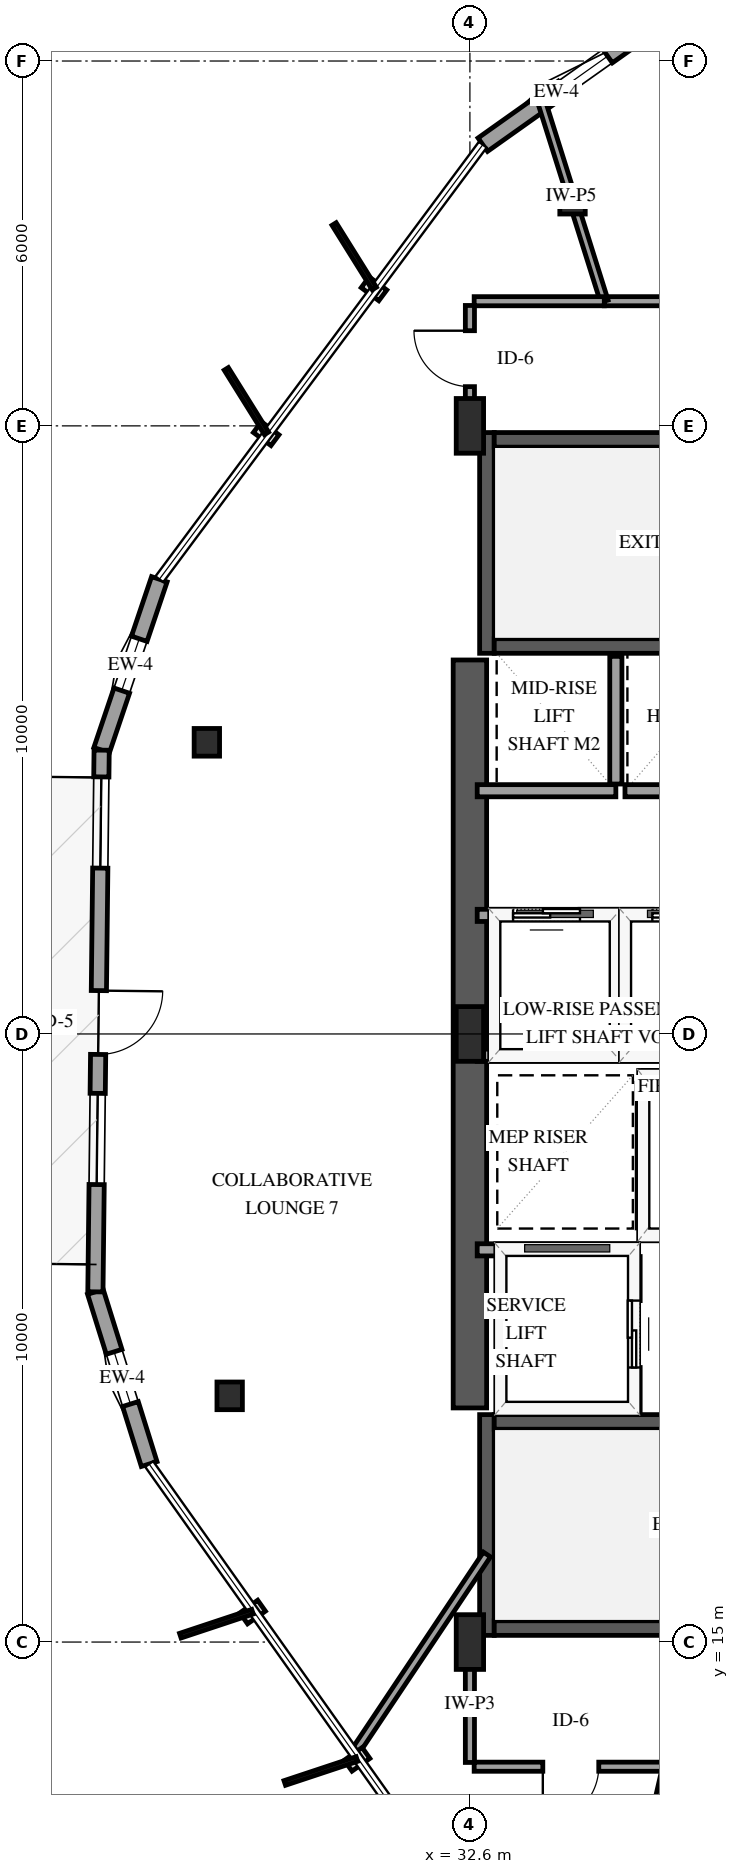
"""IFC4 building model, lengths in metres.
Left out: names, types, materials, properties, quantities, classifications, styles, units other than length and angle.
Written with IfcOpenShell. Run it as: python <this file> out.ifc"""

import sys

from ifc_helpers import new_model, si_unit, direction, frame, frame_2d, origin, origin_2d, place, context, subcontext, project, spatial, rectangle, i_section, extrude, element, fill, save


model = new_model("IFC4")
c1 = context("Model", 3, precision=1e-05, world=origin(), true_north=direction((0.0, 1.0)))
c2 = subcontext(c1, "Body", "Model", "MODEL_VIEW")
j1 = project(units=[si_unit("LENGTHUNIT", "METRE"), si_unit("PLANEANGLEUNIT", "RADIAN")], contexts=[c1])
p1 = place(None, origin())
s1 = spatial("IfcSite", under=j1, at=p1, CompositionType="ELEMENT")
p2 = place(p1, origin())
s2 = spatial("IfcBuilding", under=s1, at=p2, CompositionType="ELEMENT")
p3 = place(p2, frame((0.0, 0.0, 95.2)))
s3 = spatial("IfcBuildingStorey", under=s2, at=p3, CompositionType="ELEMENT", Elevation=95.2)
p4 = place(p3, frame((32.88, 15.11, 0.0), z_axis=(0.0, 0.0, 1.0), x_axis=(0.0, 1.0, 0.0)))
e1 = element("IfcWall", 1, at=p4, inside=s3, PredefinedType="SHEAR", context=c2, shape_type="SweptSolid", body=[
    extrude(rectangle(XDim=3.63, YDim=0.24, at=frame_2d((1.815, 0.0))), origin(), (0.0, 0.0, 1.0), 3.9),
])
for number, where, z_axis, x_axis in (
    (2, (33.0, 15.23, 0.0), (0.0, 0.0, 1.0), (1.0, 0.0, 0.0)),
    (3, (33.0, 18.62, 0.0), (0.0, 0.0, 1.0), (1.0, 0.0, 0.0)),
):
    element("IfcWall", number, at=place(p3, frame(where, z_axis=z_axis, x_axis=x_axis)), inside=s3, PredefinedType="SHEAR", context=c2, shape_type="SweptSolid", body=[
        extrude(rectangle(XDim=8.0, YDim=0.24, at=frame_2d((4.0, 0.0))), origin(), (0.0, 0.0, 1.0), 3.9),
    ])
p5 = place(p3, frame((32.88, 31.26, 0.0), z_axis=(0.0, 0.0, 1.0), x_axis=(0.0, 1.0, 0.0)))
e4 = element("IfcWall", 4, at=p5, inside=s3, PredefinedType="SHEAR", context=c2, shape_type="SweptSolid", body=[
    extrude(rectangle(XDim=3.63, YDim=0.24, at=frame_2d((1.815, 0.0))), origin(), (0.0, 0.0, 1.0), 3.9),
])
for number, where, z_axis, x_axis in (
    (5, (33.0, 31.38, 0.0), (0.0, 0.0, 1.0), (1.0, 0.0, 0.0)),
    (6, (33.0, 34.77, 0.0), (0.0, 0.0, 1.0), (1.0, 0.0, 0.0)),
):
    element("IfcWall", number, at=place(p3, frame(where, z_axis=z_axis, x_axis=x_axis)), inside=s3, PredefinedType="SHEAR", context=c2, shape_type="SweptSolid", body=[
        extrude(rectangle(XDim=8.0, YDim=0.24, at=frame_2d((4.0, 0.0))), origin(), (0.0, 0.0, 1.0), 3.9),
    ])
p6 = place(p3, frame((32.6, 18.85, 0.0), z_axis=(0.0, 0.0, 1.0), x_axis=(0.0, 1.0, 0.0)))
e7 = element("IfcWall", 7, at=p6, inside=s3, PredefinedType="SHEAR", context=c2, shape_type="SweptSolid", body=[
    extrude(rectangle(XDim=12.3, YDim=0.55, at=frame_2d((6.15, 0.0))), origin(), (0.0, 0.0, 1.0), 3.9),
])
for number, where, z_axis, x_axis in (
    (8, (32.6, 15.0, 0.0), (0.0, 0.0, 1.0), (1.0, 0.0, 0.0)),
    (9, (32.6, 25.0, 0.0), (0.0, 0.0, 1.0), (1.0, 0.0, 0.0)),
    (10, (32.6, 35.0, 0.0), (0.0, 0.0, 1.0), (1.0, 0.0, 0.0)),
):
    element("IfcColumn", number, at=place(p3, frame(where, z_axis=z_axis, x_axis=x_axis)), inside=s3, PredefinedType="PILASTER", context=c2, shape_type="SweptSolid", body=[
        extrude(rectangle(XDim=0.45, YDim=0.9, at=origin_2d()), origin(), (0.0, 0.0, 1.0), 3.9),
    ])
for number, where, z_axis, x_axis in (
    (11, (34.288, 38.711, 0.0), (0.0, 0.0, 1.0), (1.0, 0.0, 0.0)),
    (12, (28.274, 29.796, 0.0), (0.0, 0.0, 1.0), (1.0, 0.0, 0.0)),
    (13, (28.649, 19.049, 0.0), (0.0, 0.0, 1.0), (1.0, 0.0, 0.0)),
):
    element("IfcColumn", number, at=place(p3, frame(where, z_axis=z_axis, x_axis=x_axis)), inside=s3, PredefinedType="COLUMN", context=c2, shape_type="SweptSolid", body=[
        extrude(i_section(OverallWidth=0.418, OverallDepth=0.455, WebThickness=0.042, FlangeThickness=0.068, FilletRadius=0.038, at=origin_2d()), origin(), (0.0, 0.0, 1.0), 3.9),
    ])
p7 = place(p3, frame((35.232, 41.34, 0.0), z_axis=(0.0, 0.0, 1.0), x_axis=(-0.815686288548, -0.57849449321, 0.0)))
e14 = element("IfcWall", 14, at=p7, inside=s3, PredefinedType="SOLIDWALL", context=c2, shape_type="SweptSolid", body=[
    extrude(rectangle(XDim=2.967, YDim=0.27, at=frame_2d((1.483, 0.0))), origin(), (0.0, 0.0, 1.0), 2.979),
])
p8 = place(p7, frame((0.45, 0.0, 0.75)))
e15 = element("IfcOpeningElement", 15, at=p8, cuts=e14, PredefinedType="OPENING", context=c2, shape_type="SweptSolid", body=[
    extrude(rectangle(XDim=0.9, YDim=1.5, at=frame_2d((0.45, 0.75))), frame((0.0, 0.145, 0.0), z_axis=(0.0, -1.0, 0.0), x_axis=(1.0, 0.0, 0.0)), (0.0, 0.0, 1.0), 0.29),
])
p9 = place(p3, frame((27.493, 32.478, 0.0), z_axis=(0.0, 0.0, 1.0), x_axis=(-0.319978121569, -0.94742493197, 0.0)))
e16 = element("IfcWall", 16, at=p9, inside=s3, PredefinedType="SOLIDWALL", context=c2, shape_type="SweptSolid", body=[
    extrude(rectangle(XDim=2.967, YDim=0.27, at=frame_2d((1.483, 0.0))), origin(), (0.0, 0.0, 1.0), 2.979),
])
p10 = place(p9, frame((1.033, 0.0, 0.75)))
e17 = element("IfcOpeningElement", 17, at=p10, cuts=e16, PredefinedType="OPENING", context=c2, shape_type="SweptSolid", body=[
    extrude(rectangle(XDim=0.9, YDim=1.5, at=frame_2d((0.45, 0.75))), frame((0.0, 0.145, 0.0), z_axis=(0.0, -1.0, 0.0), x_axis=(1.0, 0.0, 0.0)), (0.0, 0.0, 1.0), 0.29),
])
p11 = place(p3, frame((26.441, 20.759, 0.0), z_axis=(0.0, 0.0, 1.0), x_axis=(0.297998508568, -0.954566335511, 0.0)))
e18 = element("IfcWall", 18, at=p11, inside=s3, PredefinedType="SOLIDWALL", context=c2, shape_type="SweptSolid", body=[
    extrude(rectangle(XDim=2.967, YDim=0.27, at=frame_2d((1.483, 0.0))), origin(), (0.0, 0.0, 1.0), 2.979),
])
p12 = place(p11, frame((1.033, 0.0, 0.75)))
e19 = element("IfcOpeningElement", 19, at=p12, cuts=e18, PredefinedType="OPENING", context=c2, shape_type="SweptSolid", body=[
    extrude(rectangle(XDim=0.9, YDim=1.5, at=frame_2d((0.45, 0.75))), frame((0.0, 0.145, 0.0), z_axis=(0.0, -1.0, 0.0), x_axis=(1.0, 0.0, 0.0)), (0.0, 0.0, 1.0), 0.29),
])
p13 = place(p3, frame((26.544, 29.667, 0.0), z_axis=(0.0, 0.0, 1.0), x_axis=(-0.011510186569, -0.999933755608, 0.0)))
e20 = element("IfcWall", 20, at=p13, inside=s3, PredefinedType="SOLIDWALL", context=c2, shape_type="SweptSolid", body=[
    extrude(rectangle(XDim=8.908, YDim=0.25, at=frame_2d((4.454, 0.0))), origin(), (0.0, 0.0, 1.0), 2.979),
])
p14 = place(p13, frame((3.954, 0.0, 0.0)))
e21 = element("IfcOpeningElement", 21, at=p14, cuts=e20, PredefinedType="OPENING", context=c2, shape_type="SweptSolid", body=[
    extrude(rectangle(XDim=1.05, YDim=2.15, at=frame_2d((0.525, 1.075))), frame((0.0, 0.135, 0.0), z_axis=(0.0, -1.0, 0.0), x_axis=(1.0, 0.0, 0.0)), (0.0, 0.0, 1.0), 0.27),
])
p15 = place(p13, frame((0.44, 0.0, 0.72)))
e22 = element("IfcOpeningElement", 22, at=p15, cuts=e20, PredefinedType="OPENING", context=c2, shape_type="SweptSolid", body=[
    extrude(rectangle(XDim=1.5, YDim=1.7, at=frame_2d((0.75, 0.85))), frame((0.0, 0.135, 0.0), z_axis=(0.0, -1.0, 0.0), x_axis=(1.0, 0.0, 0.0)), (0.0, 0.0, 1.0), 0.27),
])
p16 = place(p13, frame((5.644, 0.0, 0.72)))
e23 = element("IfcOpeningElement", 23, at=p16, cuts=e20, PredefinedType="OPENING", context=c2, shape_type="SweptSolid", body=[
    extrude(rectangle(XDim=1.5, YDim=1.7, at=frame_2d((0.75, 0.85))), frame((0.0, 0.135, 0.0), z_axis=(0.0, -1.0, 0.0), x_axis=(1.0, 0.0, 0.0)), (0.0, 0.0, 1.0), 0.27),
])
p17 = place(p3, frame((35.45, 21.7, 0.0), z_axis=(0.0, 0.0, 1.0), x_axis=(1.0, 0.0, 0.0)))
e24 = element("IfcWall", 24, at=p17, inside=s3, PredefinedType="SOLIDWALL", context=c2, shape_type="SweptSolid", body=[
    extrude(rectangle(XDim=2.0, YDim=0.2, at=frame_2d((1.0, 0.0))), origin(), (0.0, 0.0, 1.0), 3.6),
])
p18 = place(p17, frame((0.45, 0.0, 0.0)))
e25 = element("IfcOpeningElement", 25, at=p18, cuts=e24, PredefinedType="OPENING", context=c2, shape_type="SweptSolid", body=[
    extrude(rectangle(XDim=1.1, YDim=2.15, at=frame_2d((0.55, 1.075))), frame((0.0, 0.11, 0.0), z_axis=(0.0, -1.0, 0.0), x_axis=(1.0, 0.0, 0.0)), (0.0, 0.0, 1.0), 0.22),
])
p19 = place(p3, frame((35.45, 24.3, 0.0), z_axis=(0.0, 0.0, 1.0), x_axis=(1.0, 0.0, 0.0)))
e26 = element("IfcWall", 26, at=p19, inside=s3, PredefinedType="SOLIDWALL", context=c2, shape_type="SweptSolid", body=[
    extrude(rectangle(XDim=2.0, YDim=0.2, at=frame_2d((1.0, 0.0))), origin(), (0.0, 0.0, 1.0), 3.6),
])
p20 = place(p3, frame((35.45, 21.81, 0.0), z_axis=(0.0, 0.0, 1.0), x_axis=(0.0, 1.0, 0.0)))
e27 = element("IfcWall", 27, at=p20, inside=s3, PredefinedType="SOLIDWALL", context=c2, shape_type="SweptSolid", body=[
    extrude(rectangle(XDim=2.38, YDim=0.2, at=frame_2d((1.19, 0.0))), origin(), (0.0, 0.0, 1.0), 3.6),
])
p21 = place(p3, frame((32.72, 21.45, 0.0), z_axis=(0.0, 0.0, 1.0), x_axis=(1.0, 0.0, 0.0)))
e28 = element("IfcWall", 28, at=p21, inside=s3, PredefinedType="SOLIDWALL", context=c2, shape_type="SweptSolid", body=[
    extrude(rectangle(XDim=2.58, YDim=0.2, at=frame_2d((1.29, 0.0))), origin(), (0.0, 0.0, 1.0), 3.6),
])
p22 = place(p3, frame((35.3, 18.79, 0.0), z_axis=(0.0, 0.0, 1.0), x_axis=(0.0, 1.0, 0.0)))
e29 = element("IfcWall", 29, at=p22, inside=s3, PredefinedType="SOLIDWALL", context=c2, shape_type="SweptSolid", body=[
    extrude(rectangle(XDim=2.55, YDim=0.2, at=frame_2d((1.275, 0.0))), origin(), (0.0, 0.0, 1.0), 3.6),
])
p23 = place(p22, frame((0.725, 0.0, 0.0)))
e30 = element("IfcOpeningElement", 30, at=p23, cuts=e29, PredefinedType="OPENING", context=c2, shape_type="SweptSolid", body=[
    extrude(rectangle(XDim=1.1, YDim=2.15, at=frame_2d((0.55, 1.075))), frame((0.0, 0.11, 0.0), z_axis=(0.0, -1.0, 0.0), x_axis=(1.0, 0.0, 0.0)), (0.0, 0.0, 1.0), 0.22),
])
p24 = place(p3, frame((32.72, 24.65, 0.0), z_axis=(0.0, 0.0, 1.0), x_axis=(1.0, 0.0, 0.0)))
e31 = element("IfcWall", 31, at=p24, inside=s3, PredefinedType="SOLIDWALL", context=c2, shape_type="SweptSolid", body=[
    extrude(rectangle(XDim=2.28, YDim=0.2, at=frame_2d((1.14, 0.0))), origin(), (0.0, 0.0, 1.0), 3.6),
])
p25 = place(p3, frame((32.72, 26.95, 0.0), z_axis=(0.0, 0.0, 1.0), x_axis=(1.0, 0.0, 0.0)))
e32 = element("IfcWall", 32, at=p25, inside=s3, PredefinedType="SOLIDWALL", context=c2, shape_type="SweptSolid", body=[
    extrude(rectangle(XDim=2.28, YDim=0.2, at=frame_2d((1.14, 0.0))), origin(), (0.0, 0.0, 1.0), 3.6),
])
p26 = place(p25, frame((0.59, 0.0, 0.0)))
e33 = element("IfcOpeningElement", 33, at=p26, cuts=e32, PredefinedType="OPENING", context=c2, shape_type="SweptSolid", body=[
    extrude(rectangle(XDim=1.1, YDim=2.15, at=frame_2d((0.55, 1.075))), frame((0.0, 0.11, 0.0), z_axis=(0.0, -1.0, 0.0), x_axis=(1.0, 0.0, 0.0)), (0.0, 0.0, 1.0), 0.22),
])
p27 = place(p3, frame((35.0, 24.76, 0.0), z_axis=(0.0, 0.0, 1.0), x_axis=(0.0, 1.0, 0.0)))
e34 = element("IfcWall", 34, at=p27, inside=s3, PredefinedType="SOLIDWALL", context=c2, shape_type="SweptSolid", body=[
    extrude(rectangle(XDim=2.08, YDim=0.2, at=frame_2d((1.04, 0.0))), origin(), (0.0, 0.0, 1.0), 3.6),
])
p28 = place(p3, frame((35.15, 24.65, 0.0), z_axis=(0.0, 0.0, 1.0), x_axis=(1.0, 0.0, 0.0)))
e35 = element("IfcWall", 35, at=p28, inside=s3, PredefinedType="SOLIDWALL", context=c2, shape_type="SweptSolid", body=[
    extrude(rectangle(XDim=2.0, YDim=0.2, at=frame_2d((1.0, 0.0))), origin(), (0.0, 0.0, 1.0), 3.6),
])
p29 = place(p3, frame((35.15, 26.95, 0.0), z_axis=(0.0, 0.0, 1.0), x_axis=(1.0, 0.0, 0.0)))
e36 = element("IfcWall", 36, at=p29, inside=s3, PredefinedType="SOLIDWALL", context=c2, shape_type="SweptSolid", body=[
    extrude(rectangle(XDim=2.0, YDim=0.2, at=frame_2d((1.0, 0.0))), origin(), (0.0, 0.0, 1.0), 3.6),
])
p30 = place(p29, frame((0.45, 0.0, 0.0)))
e37 = element("IfcOpeningElement", 37, at=p30, cuts=e36, PredefinedType="OPENING", context=c2, shape_type="SweptSolid", body=[
    extrude(rectangle(XDim=1.1, YDim=2.15, at=frame_2d((0.55, 1.075))), frame((0.0, 0.11, 0.0), z_axis=(0.0, -1.0, 0.0), x_axis=(1.0, 0.0, 0.0)), (0.0, 0.0, 1.0), 0.22),
])
p31 = place(p3, frame((32.72, 29.0, 0.0), z_axis=(0.0, 0.0, 1.0), x_axis=(1.0, 0.0, 0.0)))
e38 = element("IfcWall", 38, at=p31, inside=s3, PredefinedType="SOLIDWALL", context=c2, shape_type="SweptSolid", body=[
    extrude(rectangle(XDim=2.28, YDim=0.2, at=frame_2d((1.14, 0.0))), origin(), (0.0, 0.0, 1.0), 3.6),
])
p32 = place(p3, frame((35.0, 29.11, 0.0), z_axis=(0.0, 0.0, 1.0), x_axis=(0.0, 1.0, 0.0)))
e39 = element("IfcWall", 39, at=p32, inside=s3, PredefinedType="SOLIDWALL", context=c2, shape_type="SweptSolid", body=[
    extrude(rectangle(XDim=2.1, YDim=0.2, at=frame_2d((1.05, 0.0))), origin(), (0.0, 0.0, 1.0), 3.6),
])
p33 = place(p3, frame((35.15, 29.0, 0.0), z_axis=(0.0, 0.0, 1.0), x_axis=(1.0, 0.0, 0.0)))
e40 = element("IfcWall", 40, at=p33, inside=s3, PredefinedType="SOLIDWALL", context=c2, shape_type="SweptSolid", body=[
    extrude(rectangle(XDim=2.0, YDim=0.2, at=frame_2d((1.0, 0.0))), origin(), (0.0, 0.0, 1.0), 3.6),
])
p34 = place(p3, frame((34.81, 37.05, 0.0), z_axis=(0.0, 0.0, 1.0), x_axis=(1.0, 0.0, 0.0)))
e41 = element("IfcWall", 41, at=p34, inside=s3, PredefinedType="PARTITIONING", context=c2, shape_type="SweptSolid", body=[
    extrude(rectangle(XDim=7.804, YDim=0.15, at=frame_2d((3.902, 0.0))), origin(), (0.0, 0.0, 1.0), 3.6),
])
p35 = place(p34, frame((3.427, 0.0, 0.0)))
e42 = element("IfcOpeningElement", 42, at=p35, cuts=e41, PredefinedType="OPENING", context=c2, shape_type="SweptSolid", body=[
    extrude(rectangle(XDim=0.92, YDim=2.12, at=frame_2d((0.46, 1.06))), frame((0.0, 0.085, 0.0), z_axis=(0.0, -1.0, 0.0), x_axis=(1.0, 0.0, 0.0)), (0.0, 0.0, 1.0), 0.17),
])
p36 = place(p3, frame((35.819, 12.95, 0.0), z_axis=(0.0, 0.0, 1.0), x_axis=(-0.225188335262, -0.974315253736, 0.0)))
e43 = element("IfcWall", 43, at=p36, inside=s3, PredefinedType="PARTITIONING", context=c2, shape_type="SweptSolid", body=[
    extrude(rectangle(XDim=4.175, YDim=0.1, at=frame_2d((2.087, 0.0))), origin(), (0.0, 0.0, 1.0), 2.895),
])
p37 = place(p3, frame((32.88, 16.44, 0.0), z_axis=(0.0, 0.0, 1.0), x_axis=(-0.555574599571, -0.83146669465, 0.0)))
e44 = element("IfcWall", 44, at=p37, inside=s3, PredefinedType="PARTITIONING", context=c2, shape_type="SweptSolid", body=[
    extrude(rectangle(XDim=3.929, YDim=0.14, at=frame_2d((1.964, 0.0))), origin(), (0.0, 0.0, 1.0), 3.6),
])
p38 = place(p3, frame((34.81, 37.05, 0.0), z_axis=(0.0, 0.0, 1.0), x_axis=(-0.300097719363, 0.953908464599, 0.0)))
e45 = element("IfcWall", 45, at=p38, inside=s3, PredefinedType="PARTITIONING", context=c2, shape_type="SweptSolid", body=[
    extrude(rectangle(XDim=3.629, YDim=0.13, at=frame_2d((1.814, 0.0))), origin(), (0.0, 0.0, 1.0), 2.895),
])
p39 = place(p3, frame((35.819, 12.95, 0.0), z_axis=(0.0, 0.0, 1.0), x_axis=(-1.0, 0.0, 0.0)))
e46 = element("IfcWall", 46, at=p39, inside=s3, PredefinedType="PARTITIONING", context=c2, shape_type="SweptSolid", body=[
    extrude(rectangle(XDim=3.149, YDim=0.15, at=frame_2d((1.575, 0.0))), origin(), (0.0, 0.0, 1.0), 3.6),
])
p40 = place(p39, frame((1.1, 0.0, 0.0)))
e47 = element("IfcOpeningElement", 47, at=p40, cuts=e46, PredefinedType="OPENING", context=c2, shape_type="SweptSolid", body=[
    extrude(rectangle(XDim=0.92, YDim=2.12, at=frame_2d((0.46, 1.06))), frame((0.0, 0.085, 0.0), z_axis=(0.0, -1.0, 0.0), x_axis=(1.0, 0.0, 0.0)), (0.0, 0.0, 1.0), 0.17),
])
p41 = place(p3, frame((32.67, 37.05, 0.0), z_axis=(0.0, 0.0, 1.0), x_axis=(1.0, 0.0, 0.0)))
e48 = element("IfcWall", 48, at=p41, inside=s3, PredefinedType="PARTITIONING", context=c2, shape_type="SweptSolid", body=[
    extrude(rectangle(XDim=2.14, YDim=0.15, at=frame_2d((1.07, 0.0))), origin(), (0.0, 0.0, 1.0), 3.6),
])
p42 = place(p3, frame((32.6, 13.02, 0.0), z_axis=(0.0, 0.0, 1.0), x_axis=(0.0, 1.0, 0.0)))
e49 = element("IfcWall", 49, at=p42, inside=s3, PredefinedType="PARTITIONING", context=c2, shape_type="SweptSolid", body=[
    extrude(rectangle(XDim=1.91, YDim=0.15, at=frame_2d((0.955, 0.0))), origin(), (0.0, 0.0, 1.0), 3.6),
])
p43 = place(p3, frame((32.6, 35.07, 0.0), z_axis=(0.0, 0.0, 1.0), x_axis=(0.0, 1.0, 0.0)))
e50 = element("IfcWall", 50, at=p43, inside=s3, PredefinedType="PARTITIONING", context=c2, shape_type="SweptSolid", body=[
    extrude(rectangle(XDim=1.91, YDim=0.15, at=frame_2d((0.955, 0.0))), origin(), (0.0, 0.0, 1.0), 3.6),
])
p44 = place(p43, frame((0.575, 0.0, 0.0)))
e51 = element("IfcOpeningElement", 51, at=p44, cuts=e50, PredefinedType="OPENING", context=c2, shape_type="SweptSolid", body=[
    extrude(rectangle(XDim=0.92, YDim=2.12, at=frame_2d((0.46, 1.06))), frame((0.0, 0.085, 0.0), z_axis=(0.0, -1.0, 0.0), x_axis=(1.0, 0.0, 0.0)), (0.0, 0.0, 1.0), 0.17),
])
p45 = place(p8, origin())
e52 = element("IfcWindow", 52, at=p45, inside=s3, PartitioningType="SINGLE_PANEL", PredefinedType="WINDOW", context=c2, shape_type="SweptSolid", body=[
    extrude(rectangle(XDim=0.9, YDim=1.5, at=frame_2d((0.45, 0.75))), frame((0.0, 0.03, 0.0), z_axis=(0.0, -1.0, 0.0), x_axis=(1.0, 0.0, 0.0)), (0.0, 0.0, 1.0), 0.06),
])
fill(e15, e52)
p46 = place(p10, origin())
e53 = element("IfcWindow", 53, at=p46, inside=s3, PartitioningType="SINGLE_PANEL", PredefinedType="WINDOW", context=c2, shape_type="SweptSolid", body=[
    extrude(rectangle(XDim=0.9, YDim=1.5, at=frame_2d((0.45, 0.75))), frame((0.0, 0.03, 0.0), z_axis=(0.0, -1.0, 0.0), x_axis=(1.0, 0.0, 0.0)), (0.0, 0.0, 1.0), 0.06),
])
fill(e17, e53)
p47 = place(p12, origin())
e54 = element("IfcWindow", 54, at=p47, inside=s3, PartitioningType="SINGLE_PANEL", PredefinedType="WINDOW", context=c2, shape_type="SweptSolid", body=[
    extrude(rectangle(XDim=0.9, YDim=1.5, at=frame_2d((0.45, 0.75))), frame((0.0, 0.03, 0.0), z_axis=(0.0, -1.0, 0.0), x_axis=(1.0, 0.0, 0.0)), (0.0, 0.0, 1.0), 0.06),
])
fill(e19, e54)
p48 = place(p14, origin())
e55 = element("IfcDoor", 55, at=p48, inside=s3, OperationType="SINGLE_SWING_LEFT", PredefinedType="DOOR", context=c2, shape_type="SweptSolid", body=[
    extrude(rectangle(XDim=1.05, YDim=2.15, at=frame_2d((0.525, 1.075))), frame((0.0, 0.025, 0.0), z_axis=(0.0, -1.0, 0.0), x_axis=(1.0, 0.0, 0.0)), (0.0, 0.0, 1.0), 0.05),
])
fill(e21, e55)
p49 = place(p15, origin())
e56 = element("IfcWindow", 56, at=p49, inside=s3, PartitioningType="SINGLE_PANEL", PredefinedType="WINDOW", context=c2, shape_type="SweptSolid", body=[
    extrude(rectangle(XDim=1.5, YDim=1.7, at=frame_2d((0.75, 0.85))), frame((0.0, 0.03, 0.0), z_axis=(0.0, -1.0, 0.0), x_axis=(1.0, 0.0, 0.0)), (0.0, 0.0, 1.0), 0.06),
])
fill(e22, e56)
p50 = place(p16, origin())
e57 = element("IfcWindow", 57, at=p50, inside=s3, PartitioningType="SINGLE_PANEL", PredefinedType="WINDOW", context=c2, shape_type="SweptSolid", body=[
    extrude(rectangle(XDim=1.5, YDim=1.7, at=frame_2d((0.75, 0.85))), frame((0.0, 0.03, 0.0), z_axis=(0.0, -1.0, 0.0), x_axis=(1.0, 0.0, 0.0)), (0.0, 0.0, 1.0), 0.06),
])
fill(e23, e57)
p51 = place(p23, origin())
e58 = element("IfcDoor", 58, at=p51, inside=s3, OperationType="SLIDING_TO_LEFT", PredefinedType="DOOR", context=c2, shape_type="SweptSolid", body=[
    extrude(rectangle(XDim=1.1, YDim=2.15, at=frame_2d((0.55, 1.075))), frame((0.0, 0.025, 0.0), z_axis=(0.0, -1.0, 0.0), x_axis=(1.0, 0.0, 0.0)), (0.0, 0.0, 1.0), 0.05),
])
fill(e30, e58)
p52 = place(p26, origin())
e59 = element("IfcDoor", 59, at=p52, inside=s3, OperationType="SLIDING_TO_LEFT", PredefinedType="DOOR", context=c2, shape_type="SweptSolid", body=[
    extrude(rectangle(XDim=1.1, YDim=2.15, at=frame_2d((0.55, 1.075))), frame((0.0, 0.025, 0.0), z_axis=(0.0, -1.0, 0.0), x_axis=(1.0, 0.0, 0.0)), (0.0, 0.0, 1.0), 0.05),
])
fill(e33, e59)
p53 = place(p30, origin())
e60 = element("IfcDoor", 60, at=p53, inside=s3, OperationType="SLIDING_TO_LEFT", PredefinedType="DOOR", context=c2, shape_type="SweptSolid", body=[
    extrude(rectangle(XDim=1.1, YDim=2.15, at=frame_2d((0.55, 1.075))), frame((0.0, 0.025, 0.0), z_axis=(0.0, -1.0, 0.0), x_axis=(1.0, 0.0, 0.0)), (0.0, 0.0, 1.0), 0.05),
])
fill(e37, e60)
p54 = place(p40, origin())
e61 = element("IfcDoor", 61, at=p54, inside=s3, OperationType="SINGLE_SWING_RIGHT", PredefinedType="DOOR", context=c2, shape_type="SweptSolid", body=[
    extrude(rectangle(XDim=0.92, YDim=2.12, at=frame_2d((0.46, 1.06))), frame((0.0, 0.025, 0.0), z_axis=(0.0, -1.0, 0.0), x_axis=(1.0, 0.0, 0.0)), (0.0, 0.0, 1.0), 0.05),
])
fill(e47, e61)
p55 = place(p44, origin())
e62 = element("IfcDoor", 62, at=p55, inside=s3, OperationType="SINGLE_SWING_RIGHT", PredefinedType="DOOR", context=c2, shape_type="SweptSolid", body=[
    extrude(rectangle(XDim=0.92, YDim=2.12, at=frame_2d((0.46, 1.06))), frame((0.0, 0.025, 0.0), z_axis=(0.0, -1.0, 0.0), x_axis=(1.0, 0.0, 0.0)), (0.0, 0.0, 1.0), 0.05),
])
fill(e51, e62)
save(model, sys.argv[1])
